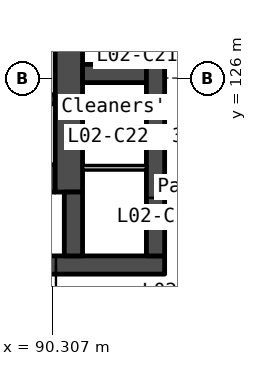
"""IFC4 building model, lengths in metres.
Left out: names, types, materials, properties, quantities, classifications, styles, units other than length and angle.
Written with IfcOpenShell. Run it as: python <this file> out.ifc"""

import sys

from ifc_helpers import new_model, si_unit, direction, frame, frame_2d, origin, place, context, subcontext, project, spatial, rectangle, extrude, element, fill, save


model = new_model("IFC4")
c1 = context("Model", 3, precision=1e-05, world=origin(), true_north=direction((0.0, 1.0)))
c2 = subcontext(c1, "Body", "Model", "MODEL_VIEW")
j1 = project(units=[si_unit("LENGTHUNIT", "METRE"), si_unit("PLANEANGLEUNIT", "RADIAN")], contexts=[c1])
p1 = place(None, origin())
s1 = spatial("IfcSite", under=j1, at=p1, CompositionType="ELEMENT")
p2 = place(p1, origin())
s2 = spatial("IfcBuilding", under=s1, at=p2, CompositionType="ELEMENT")
p3 = place(p2, frame((0.0, 0.0, 13.5)))
s3 = spatial("IfcBuildingStorey", under=s2, at=p3, CompositionType="ELEMENT", Elevation=13.5)
p4 = place(p3, frame((66.0, 119.85, 0.0), z_axis=(0.0, 0.0, 1.0), x_axis=(1.0, 0.0, 0.0)))
e1 = element("IfcWall", 1, at=p4, inside=s3, PredefinedType="SOLIDWALL", context=c2, shape_type="SweptSolid", body=[
    extrude(rectangle(XDim=28.0, YDim=0.6, at=frame_2d((14.0, 0.0))), origin(), (0.0, 0.0, 1.0), 5.75),
])
p5 = place(p4, frame((6.825, 0.0, 0.0)))
e2 = element("IfcOpeningElement", 2, at=p5, cuts=e1, PredefinedType="OPENING", context=c2, shape_type="SweptSolid", body=[
    extrude(rectangle(XDim=1.8, YDim=2.1, at=frame_2d((0.9, 1.05))), frame((0.0, 0.31, 0.0), z_axis=(0.0, -1.0, 0.0), x_axis=(1.0, 0.0, 0.0)), (0.0, 0.0, 1.0), 0.62),
])
p6 = place(p4, frame((15.85, 0.0, 0.0)))
e3 = element("IfcOpeningElement", 3, at=p6, cuts=e1, PredefinedType="OPENING", context=c2, shape_type="SweptSolid", body=[
    extrude(rectangle(XDim=1.5, YDim=2.1, at=frame_2d((0.75, 1.05))), frame((0.0, 0.31, 0.0), z_axis=(0.0, -1.0, 0.0), x_axis=(1.0, 0.0, 0.0)), (0.0, 0.0, 1.0), 0.62),
])
p7 = place(p4, frame((19.375, 0.0, 0.0)))
e4 = element("IfcOpeningElement", 4, at=p7, cuts=e1, PredefinedType="OPENING", context=c2, shape_type="SweptSolid", body=[
    extrude(rectangle(XDim=1.8, YDim=2.1, at=frame_2d((0.9, 1.05))), frame((0.0, 0.31, 0.0), z_axis=(0.0, -1.0, 0.0), x_axis=(1.0, 0.0, 0.0)), (0.0, 0.0, 1.0), 0.62),
])
p8 = place(p4, frame((4.425, 0.0, 0.0)))
e5 = element("IfcOpeningElement", 5, at=p8, cuts=e1, PredefinedType="OPENING", context=c2, shape_type="SweptSolid", body=[
    extrude(rectangle(XDim=1.0, YDim=2.1, at=frame_2d((0.5, 1.05))), frame((0.0, 0.31, 0.0), z_axis=(0.0, -1.0, 0.0), x_axis=(1.0, 0.0, 0.0)), (0.0, 0.0, 1.0), 0.62),
])
p9 = place(p4, frame((9.783, 0.0, 0.0)))
e6 = element("IfcOpeningElement", 6, at=p9, cuts=e1, PredefinedType="OPENING", context=c2, shape_type="SweptSolid", body=[
    extrude(rectangle(XDim=1.0, YDim=2.1, at=frame_2d((0.5, 1.05))), frame((0.0, 0.31, 0.0), z_axis=(0.0, -1.0, 0.0), x_axis=(1.0, 0.0, 0.0)), (0.0, 0.0, 1.0), 0.62),
])
p10 = place(p4, frame((11.525, 0.0, 0.0)))
e7 = element("IfcOpeningElement", 7, at=p10, cuts=e1, PredefinedType="OPENING", context=c2, shape_type="SweptSolid", body=[
    extrude(rectangle(XDim=1.0, YDim=2.1, at=frame_2d((0.5, 1.05))), frame((0.0, 0.31, 0.0), z_axis=(0.0, -1.0, 0.0), x_axis=(1.0, 0.0, 0.0)), (0.0, 0.0, 1.0), 0.62),
])
p11 = place(p4, frame((13.658, 0.0, 0.0)))
e8 = element("IfcOpeningElement", 8, at=p11, cuts=e1, PredefinedType="OPENING", context=c2, shape_type="SweptSolid", body=[
    extrude(rectangle(XDim=1.0, YDim=2.1, at=frame_2d((0.5, 1.05))), frame((0.0, 0.31, 0.0), z_axis=(0.0, -1.0, 0.0), x_axis=(1.0, 0.0, 0.0)), (0.0, 0.0, 1.0), 0.62),
])
p12 = place(p4, frame((21.725, 0.0, 0.0)))
e9 = element("IfcOpeningElement", 9, at=p12, cuts=e1, PredefinedType="OPENING", context=c2, shape_type="SweptSolid", body=[
    extrude(rectangle(XDim=1.0, YDim=2.1, at=frame_2d((0.5, 1.05))), frame((0.0, 0.31, 0.0), z_axis=(0.0, -1.0, 0.0), x_axis=(1.0, 0.0, 0.0)), (0.0, 0.0, 1.0), 0.62),
])
p13 = place(p4, frame((23.425, 0.0, 0.0)))
e10 = element("IfcOpeningElement", 10, at=p13, cuts=e1, PredefinedType="OPENING", context=c2, shape_type="SweptSolid", body=[
    extrude(rectangle(XDim=1.0, YDim=2.1, at=frame_2d((0.5, 1.05))), frame((0.0, 0.31, 0.0), z_axis=(0.0, -1.0, 0.0), x_axis=(1.0, 0.0, 0.0)), (0.0, 0.0, 1.0), 0.62),
])
p14 = place(p3, frame((87.85, 125.3, 0.0), z_axis=(0.0, 0.0, 1.0), x_axis=(1.0, 0.0, 0.0)))
e11 = element("IfcWall", 11, at=p14, inside=s3, PredefinedType="SOLIDWALL", context=c2, shape_type="SweptSolid", body=[
    extrude(rectangle(XDim=2.55, YDim=0.3, at=frame_2d((1.275, 0.0))), origin(), (0.0, 0.0, 1.0), 5.75),
])
p15 = place(p3, frame((87.85, 122.7, 0.0), z_axis=(0.0, 0.0, 1.0), x_axis=(1.0, 0.0, 0.0)))
e12 = element("IfcWall", 12, at=p15, inside=s3, PredefinedType="SOLIDWALL", context=c2, shape_type="SweptSolid", body=[
    extrude(rectangle(XDim=2.55, YDim=0.9, at=frame_2d((1.275, 0.0))), origin(), (0.0, 0.0, 1.0), 5.75),
])
p16 = place(p3, frame((90.85, 133.95, 0.0), z_axis=(0.0, 0.0, 1.0), x_axis=(0.0, -1.0, 0.0)))
e13 = element("IfcWall", 13, at=p16, inside=s3, PredefinedType="SOLIDWALL", context=c2, shape_type="SweptSolid", body=[
    extrude(rectangle(XDim=11.7, YDim=0.9, at=frame_2d((5.85, 0.0))), origin(), (0.0, 0.0, 1.0), 5.75),
])
p17 = place(p3, frame((91.0, 122.25, 0.0), z_axis=(0.0, 0.0, 1.0), x_axis=(0.0, -1.0, 0.0)))
e14 = element("IfcWall", 14, at=p17, inside=s3, PredefinedType="SOLIDWALL", context=c2, shape_type="SweptSolid", body=[
    extrude(rectangle(XDim=2.1, YDim=0.6, at=frame_2d((1.05, 0.0))), origin(), (0.0, 0.0, 1.0), 5.75),
])
p18 = place(p3, frame((91.3, 126.15, 0.0), z_axis=(0.0, 0.0, 1.0), x_axis=(1.0, 0.0, 0.0)))
e15 = element("IfcWall", 15, at=p18, inside=s3, PredefinedType="SOLIDWALL", context=c2, shape_type="SweptSolid", body=[
    extrude(rectangle(XDim=2.1, YDim=0.6, at=frame_2d((1.05, 0.0))), origin(), (0.0, 0.0, 1.0), 5.75),
])
p19 = place(p3, frame((91.3, 123.049, 0.0), z_axis=(0.0, 0.0, 1.0), x_axis=(1.0, 0.0, 0.0)))
e16 = element("IfcWall", 16, at=p19, inside=s3, PredefinedType="PARTITIONING", context=c2, shape_type="SweptSolid", body=[
    extrude(rectangle(XDim=2.1, YDim=0.15, at=frame_2d((1.05, 0.0))), origin(), (0.0, 0.0, 1.0), 5.75),
])
p20 = place(p3, frame((93.7, 133.95, 0.0), z_axis=(0.0, 0.0, 1.0), x_axis=(0.0, -1.0, 0.0)))
e17 = element("IfcWall", 17, at=p20, inside=s3, PredefinedType="SOLIDWALL", context=c2, shape_type="SweptSolid", body=[
    extrude(rectangle(XDim=13.8, YDim=0.6, at=frame_2d((6.9, 0.0))), origin(), (0.0, 0.0, 1.0), 5.75),
])
p21 = place(p20, frame((0.6, 0.0, 0.0)))
e18 = element("IfcOpeningElement", 18, at=p21, cuts=e17, PredefinedType="OPENING", context=c2, shape_type="SweptSolid", body=[
    extrude(rectangle(XDim=1.1, YDim=2.1, at=frame_2d((0.55, 1.05))), frame((0.0, 0.31, 0.0), z_axis=(0.0, -1.0, 0.0), x_axis=(1.0, 0.0, 0.0)), (0.0, 0.0, 1.0), 0.62),
])
p22 = place(p20, frame((8.963, 0.0, 0.0)))
e19 = element("IfcOpeningElement", 19, at=p22, cuts=e17, PredefinedType="OPENING", context=c2, shape_type="SweptSolid", body=[
    extrude(rectangle(XDim=1.0, YDim=2.1, at=frame_2d((0.5, 1.05))), frame((0.0, 0.31, 0.0), z_axis=(0.0, -1.0, 0.0), x_axis=(1.0, 0.0, 0.0)), (0.0, 0.0, 1.0), 0.62),
])
p23 = place(p20, frame((11.888, 0.0, 0.0)))
e20 = element("IfcOpeningElement", 20, at=p23, cuts=e17, PredefinedType="OPENING", context=c2, shape_type="SweptSolid", body=[
    extrude(rectangle(XDim=1.0, YDim=2.1, at=frame_2d((0.5, 1.05))), frame((0.0, 0.31, 0.0), z_axis=(0.0, -1.0, 0.0), x_axis=(1.0, 0.0, 0.0)), (0.0, 0.0, 1.0), 0.62),
])
p24 = place(p3, frame((133.302, 129.091, 0.0), z_axis=(0.0, 0.0, 1.0), x_axis=(-0.500000924498, -0.866024870025, 0.0)))
e21 = element("IfcWall", 21, at=p24, inside=s3, PredefinedType="STANDARD", context=c2, shape_type="SweptSolid", body=[
    extrude(rectangle(XDim=100.935, YDim=1.0, at=frame_2d((50.467, 0.0))), origin(), (0.0, 0.0, 1.0), 0.6),
])
p25 = place(p22, origin())
e22 = element("IfcDoor", 22, at=p25, inside=s3, OperationType="SINGLE_SWING_LEFT", PredefinedType="DOOR", context=c2, shape_type="SweptSolid", body=[
    extrude(rectangle(XDim=1.0, YDim=2.1, at=frame_2d((0.5, 1.05))), frame((0.0, 0.025, 0.0), z_axis=(0.0, -1.0, 0.0), x_axis=(1.0, 0.0, 0.0)), (0.0, 0.0, 1.0), 0.05),
])
fill(e19, e22)
p26 = place(p23, origin())
e23 = element("IfcDoor", 23, at=p26, inside=s3, OperationType="SINGLE_SWING_LEFT", PredefinedType="DOOR", context=c2, shape_type="SweptSolid", body=[
    extrude(rectangle(XDim=1.0, YDim=2.1, at=frame_2d((0.5, 1.05))), frame((0.0, 0.025, 0.0), z_axis=(0.0, -1.0, 0.0), x_axis=(1.0, 0.0, 0.0)), (0.0, 0.0, 1.0), 0.05),
])
fill(e20, e23)
p27 = place(p13, origin())
e24 = element("IfcDoor", 24, at=p27, inside=s3, OperationType="SINGLE_SWING_RIGHT", PredefinedType="DOOR", context=c2, shape_type="SweptSolid", body=[
    extrude(rectangle(XDim=1.0, YDim=2.1, at=frame_2d((0.5, 1.05))), frame((0.0, 0.025, 0.0), z_axis=(0.0, -1.0, 0.0), x_axis=(1.0, 0.0, 0.0)), (0.0, 0.0, 1.0), 0.05),
])
fill(e10, e24)
save(model, sys.argv[1])
